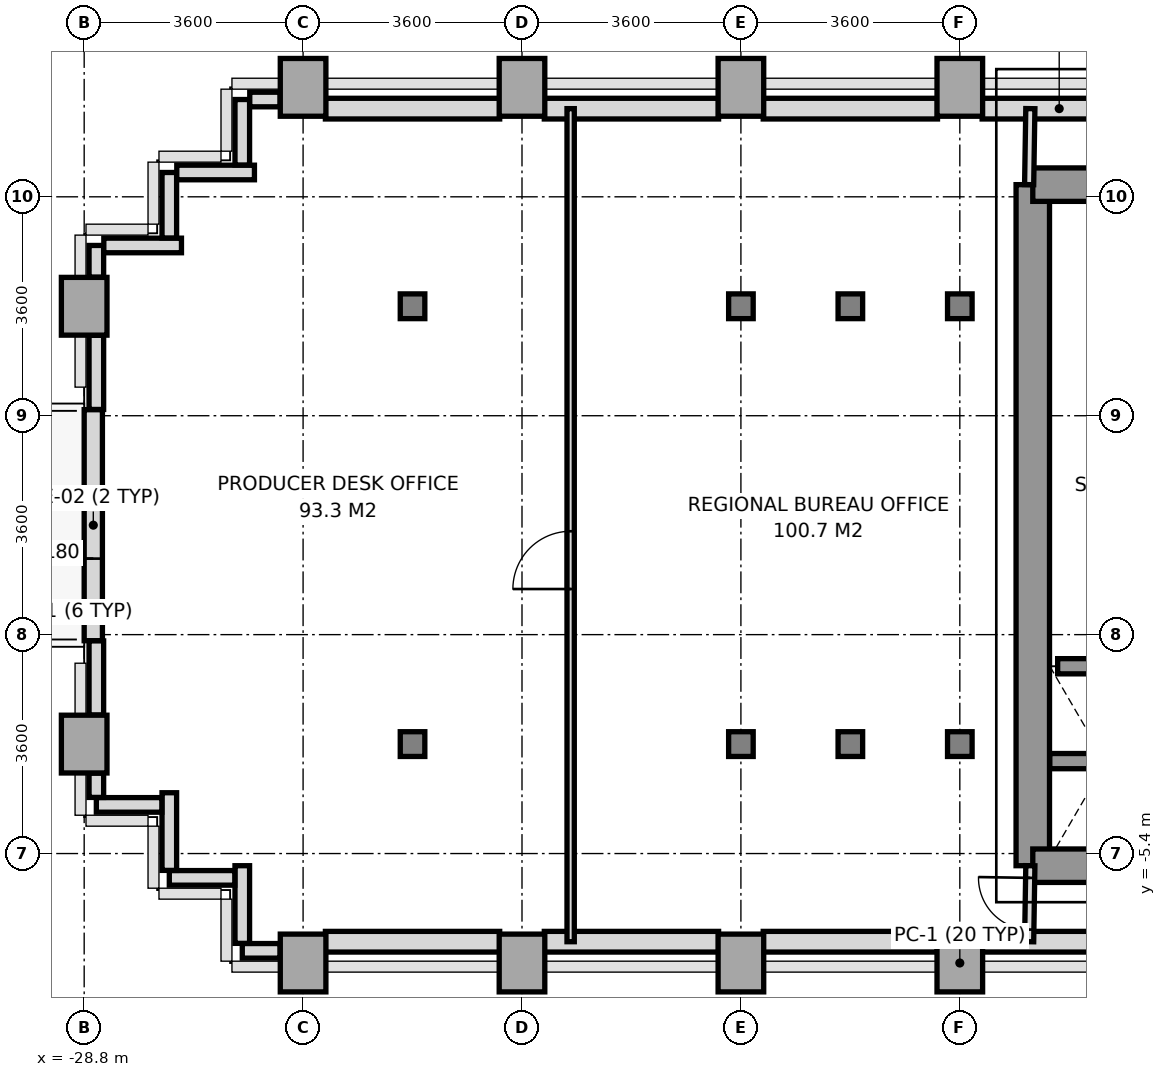
"""IFC4 building model, lengths in metres.
Left out: names, types, materials, properties, quantities, classifications, styles, units other than length and angle.
Written with IfcOpenShell. Run it as: python <this file> out.ifc"""

import sys

from ifc_helpers import new_model, si_unit, direction, frame, frame_2d, origin, origin_2d, place, context, subcontext, project, spatial, rectangle, i_section, extrude, source, transform, mapped, element, fill, save


model = new_model("IFC4")
c1 = context("Model", 3, precision=1e-05, world=origin(), true_north=direction((0.0, 1.0)))
c2 = subcontext(c1, "Body", "Model", "MODEL_VIEW")
j1 = project(units=[si_unit("LENGTHUNIT", "METRE"), si_unit("PLANEANGLEUNIT", "RADIAN")], contexts=[c1])
p1 = place(None, origin())
s1 = spatial("IfcSite", under=j1, at=p1, CompositionType="ELEMENT")
p2 = place(p1, origin())
s2 = spatial("IfcBuilding", under=s1, at=p2, CompositionType="ELEMENT")
p3 = place(p2, frame((0.0, 0.0, 44.2)))
s3 = spatial("IfcBuildingStorey", under=s2, at=p3, CompositionType="ELEMENT", Elevation=44.2)
m1 = source(origin(), c2, "Body", "SweptSolid", [
    extrude(rectangle(XDim=0.75, YDim=0.95, at=origin_2d()), origin(), (0.0, 0.0, 1.0), 3.2),
])
for number, where, z_axis, x_axis in (
    (1, (-28.8, -3.6, 0.0), (0.0, 0.0, 1.0), (1.0, 0.0, 0.0)),
    (2, (-28.8, 3.6, 0.0), (0.0, 0.0, 1.0), (1.0, 0.0, 0.0)),
    (3, (-25.2, -7.2, 0.0), (0.0, 0.0, 1.0), (1.0, 0.0, 0.0)),
    (4, (-25.2, 7.2, 0.0), (0.0, 0.0, 1.0), (1.0, 0.0, 0.0)),
):
    element("IfcColumn", number, at=place(p3, frame(where, z_axis=z_axis, x_axis=x_axis)), inside=s3, PredefinedType="COLUMN", context=c2, shape_type="MappedRepresentation", body=[
        mapped(m1, transform((0.0, 0.0, 0.0), x_axis=(1.0, 0.0, 0.0), y_axis=(0.0, 1.0, 0.0), z_axis=(0.0, 0.0, 1.0), scale=1.0)),
    ])
m2 = source(origin(), c2, "Body", "SweptSolid", [
    extrude(i_section(OverallWidth=0.404, OverallDepth=0.407, WebThickness=0.022, FlangeThickness=0.035, at=origin_2d()), origin(), (0.0, 0.0, 1.0), 3.2),
])
for number, where, z_axis, x_axis in (
    (5, (-23.4, -3.6, 0.0), (0.0, 0.0, 1.0), (1.0, 0.0, 0.0)),
    (6, (-23.4, 3.6, 0.0), (0.0, 0.0, 1.0), (1.0, 0.0, 0.0)),
):
    element("IfcColumn", number, at=place(p3, frame(where, z_axis=z_axis, x_axis=x_axis)), inside=s3, PredefinedType="COLUMN", context=c2, shape_type="MappedRepresentation", body=[
        mapped(m2, transform((0.0, 0.0, 0.0), x_axis=(1.0, 0.0, 0.0), y_axis=(0.0, 1.0, 0.0), z_axis=(0.0, 0.0, 1.0), scale=1.0)),
    ])
for number, where, z_axis, x_axis in (
    (7, (-21.6, -7.2, 0.0), (0.0, 0.0, 1.0), (1.0, 0.0, 0.0)),
    (8, (-21.6, 7.2, 0.0), (0.0, 0.0, 1.0), (1.0, 0.0, 0.0)),
    (9, (-18.0, -7.2, 0.0), (0.0, 0.0, 1.0), (1.0, 0.0, 0.0)),
):
    element("IfcColumn", number, at=place(p3, frame(where, z_axis=z_axis, x_axis=x_axis)), inside=s3, PredefinedType="COLUMN", context=c2, shape_type="MappedRepresentation", body=[
        mapped(m1, transform((0.0, 0.0, 0.0), x_axis=(1.0, 0.0, 0.0), y_axis=(0.0, 1.0, 0.0), z_axis=(0.0, 0.0, 1.0), scale=1.0)),
    ])
for number, where, z_axis, x_axis in (
    (10, (-18.0, -3.6, 0.0), (0.0, 0.0, 1.0), (1.0, 0.0, 0.0)),
    (11, (-18.0, 3.6, 0.0), (0.0, 0.0, 1.0), (1.0, 0.0, 0.0)),
):
    element("IfcColumn", number, at=place(p3, frame(where, z_axis=z_axis, x_axis=x_axis)), inside=s3, PredefinedType="COLUMN", context=c2, shape_type="MappedRepresentation", body=[
        mapped(m2, transform((0.0, 0.0, 0.0), x_axis=(1.0, 0.0, 0.0), y_axis=(0.0, 1.0, 0.0), z_axis=(0.0, 0.0, 1.0), scale=1.0)),
    ])
p4 = place(p3, frame((-18.0, 7.2, 0.0), z_axis=(0.0, 0.0, 1.0), x_axis=(1.0, 0.0, 0.0)))
e12 = element("IfcColumn", 12, at=p4, inside=s3, PredefinedType="COLUMN", context=c2, shape_type="MappedRepresentation", body=[
    mapped(m1, transform((0.0, 0.0, 0.0), x_axis=(1.0, 0.0, 0.0), y_axis=(0.0, 1.0, 0.0), z_axis=(0.0, 0.0, 1.0), scale=1.0)),
])
for number, where, z_axis, x_axis in (
    (13, (-16.2, -3.6, 0.0), (0.0, 0.0, 1.0), (1.0, 0.0, 0.0)),
    (14, (-16.2, 3.6, 0.0), (0.0, 0.0, 1.0), (1.0, 0.0, 0.0)),
):
    element("IfcColumn", number, at=place(p3, frame(where, z_axis=z_axis, x_axis=x_axis)), inside=s3, PredefinedType="COLUMN", context=c2, shape_type="MappedRepresentation", body=[
        mapped(m2, transform((0.0, 0.0, 0.0), x_axis=(1.0, 0.0, 0.0), y_axis=(0.0, 1.0, 0.0), z_axis=(0.0, 0.0, 1.0), scale=1.0)),
    ])
p5 = place(p3, frame((-14.4, -7.2, 0.0), z_axis=(0.0, 0.0, 1.0), x_axis=(1.0, 0.0, 0.0)))
e15 = element("IfcColumn", 15, at=p5, inside=s3, PredefinedType="COLUMN", context=c2, shape_type="MappedRepresentation", body=[
    mapped(m1, transform((0.0, 0.0, 0.0), x_axis=(1.0, 0.0, 0.0), y_axis=(0.0, 1.0, 0.0), z_axis=(0.0, 0.0, 1.0), scale=1.0)),
])
for number, where, z_axis, x_axis in (
    (16, (-14.4, -3.6, 0.0), (0.0, 0.0, 1.0), (1.0, 0.0, 0.0)),
    (17, (-14.4, 3.6, 0.0), (0.0, 0.0, 1.0), (1.0, 0.0, 0.0)),
):
    element("IfcColumn", number, at=place(p3, frame(where, z_axis=z_axis, x_axis=x_axis)), inside=s3, PredefinedType="COLUMN", context=c2, shape_type="MappedRepresentation", body=[
        mapped(m2, transform((0.0, 0.0, 0.0), x_axis=(1.0, 0.0, 0.0), y_axis=(0.0, 1.0, 0.0), z_axis=(0.0, 0.0, 1.0), scale=1.0)),
    ])
p6 = place(p3, frame((-14.4, 7.2, 0.0), z_axis=(0.0, 0.0, 1.0), x_axis=(1.0, 0.0, 0.0)))
e18 = element("IfcColumn", 18, at=p6, inside=s3, PredefinedType="COLUMN", context=c2, shape_type="MappedRepresentation", body=[
    mapped(m1, transform((0.0, 0.0, 0.0), x_axis=(1.0, 0.0, 0.0), y_axis=(0.0, 1.0, 0.0), z_axis=(0.0, 0.0, 1.0), scale=1.0)),
])
for number, where, z_axis, x_axis in (
    (19, (-24.833, 6.85, 0.0), (0.0, 0.0, 1.0), (1.0, 0.0, 0.0)),
    (20, (-21.233, 6.85, 0.0), (0.0, 0.0, 1.0), (1.0, 0.0, 0.0)),
    (21, (-17.633, 6.85, 0.0), (0.0, 0.0, 1.0), (1.0, 0.0, 0.0)),
):
    element("IfcWall", number, at=place(p3, frame(where, z_axis=z_axis, x_axis=x_axis)), inside=s3, PredefinedType="SOLIDWALL", context=c2, shape_type="SweptSolid", body=[
        extrude(rectangle(XDim=2.866, YDim=0.34, at=frame_2d((1.433, 0.0))), origin(), (0.0, 0.0, 1.0), 2.45),
    ])
p7 = place(p3, frame((-14.033, 6.85, 0.0), z_axis=(0.0, 0.0, 1.0), x_axis=(1.0, 0.0, 0.0)))
e22 = element("IfcWall", 22, at=p7, inside=s3, PredefinedType="SOLIDWALL", context=c2, shape_type="SweptSolid", body=[
    extrude(rectangle(XDim=2.535, YDim=0.34, at=frame_2d((1.268, 0.0))), origin(), (0.0, 0.0, 1.0), 3.2),
])
for number, where, z_axis, x_axis in (
    (23, (-24.833, -6.85, 0.0), (0.0, 0.0, 1.0), (1.0, 0.0, 0.0)),
    (24, (-21.233, -6.85, 0.0), (0.0, 0.0, 1.0), (1.0, 0.0, 0.0)),
    (25, (-17.633, -6.85, 0.0), (0.0, 0.0, 1.0), (1.0, 0.0, 0.0)),
):
    element("IfcWall", number, at=place(p3, frame(where, z_axis=z_axis, x_axis=x_axis)), inside=s3, PredefinedType="SOLIDWALL", context=c2, shape_type="SweptSolid", body=[
        extrude(rectangle(XDim=2.866, YDim=0.34, at=frame_2d((1.433, 0.0))), origin(), (0.0, 0.0, 1.0), 2.45),
    ])
p8 = place(p3, frame((-14.033, -6.85, 0.0), z_axis=(0.0, 0.0, 1.0), x_axis=(1.0, 0.0, 0.0)))
e26 = element("IfcWall", 26, at=p8, inside=s3, PredefinedType="SOLIDWALL", context=c2, shape_type="SweptSolid", body=[
    extrude(rectangle(XDim=2.283, YDim=0.34, at=frame_2d((1.142, 0.0))), origin(), (0.0, 0.0, 1.0), 3.2),
])
p9 = place(p3, frame((-28.65, -1.9, 0.0), z_axis=(0.0, 0.0, 1.0), x_axis=(0.0, 1.0, 0.0)))
e27 = element("IfcWall", 27, at=p9, inside=s3, PredefinedType="SOLIDWALL", context=c2, shape_type="SweptSolid", body=[
    extrude(rectangle(XDim=3.8, YDim=0.3, at=frame_2d((1.9, 0.0))), origin(), (0.0, 0.0, 1.0), 2.45),
])
p10 = place(p9, frame((1.35, 0.0, 0.0)))
e28 = element("IfcOpeningElement", 28, at=p10, cuts=e27, PredefinedType="OPENING", context=c2, shape_type="SweptSolid", body=[
    extrude(rectangle(XDim=1.1, YDim=2.3, at=frame_2d((0.55, 1.15))), frame((0.0, 0.16, 0.0), z_axis=(0.0, -1.0, 0.0), x_axis=(1.0, 0.0, 0.0)), (0.0, 0.0, 1.0), 0.32),
])
p11 = place(p3, frame((-25.578, -7.0, 0.0), z_axis=(0.0, 0.0, 1.0), x_axis=(-1.0, 0.0, 0.0)))
e29 = element("IfcWall", 29, at=p11, inside=s3, PredefinedType="PARAPET", context=c2, shape_type="SweptSolid", body=[
    extrude(rectangle(XDim=0.622, YDim=0.24, at=frame_2d((0.311, 0.0))), origin(), (0.0, 0.0, 1.0), 1.15),
])
p12 = place(p3, frame((-26.2, -6.877, 0.0), z_axis=(0.0, 0.0, 1.0), x_axis=(0.0, 1.0, 0.0)))
e30 = element("IfcWall", 30, at=p12, inside=s3, PredefinedType="PARAPET", context=c2, shape_type="SweptSolid", body=[
    extrude(rectangle(XDim=1.277, YDim=0.24, at=frame_2d((0.638, 0.0))), origin(), (0.0, 0.0, 1.0), 1.15),
])
p13 = place(p3, frame((-26.323, -5.8, 0.0), z_axis=(0.0, 0.0, 1.0), x_axis=(-1.0, 0.0, 0.0)))
e31 = element("IfcWall", 31, at=p13, inside=s3, PredefinedType="PARAPET", context=c2, shape_type="SweptSolid", body=[
    extrude(rectangle(XDim=1.077, YDim=0.24, at=frame_2d((0.539, 0.0))), origin(), (0.0, 0.0, 1.0), 1.15),
])
p14 = place(p3, frame((-27.4, -5.677, 0.0), z_axis=(0.0, 0.0, 1.0), x_axis=(0.0, 1.0, 0.0)))
e32 = element("IfcWall", 32, at=p14, inside=s3, PredefinedType="PARAPET", context=c2, shape_type="SweptSolid", body=[
    extrude(rectangle(XDim=1.277, YDim=0.24, at=frame_2d((0.639, 0.0))), origin(), (0.0, 0.0, 1.0), 1.15),
])
p15 = place(p3, frame((-27.523, -4.6, 0.0), z_axis=(0.0, 0.0, 1.0), x_axis=(-1.0, 0.0, 0.0)))
e33 = element("IfcWall", 33, at=p15, inside=s3, PredefinedType="PARAPET", context=c2, shape_type="SweptSolid", body=[
    extrude(rectangle(XDim=1.077, YDim=0.24, at=frame_2d((0.539, 0.0))), origin(), (0.0, 0.0, 1.0), 1.15),
])
p16 = place(p3, frame((-28.6, -4.477, 0.0), z_axis=(0.0, 0.0, 1.0), x_axis=(0.0, 1.0, 0.0)))
e34 = element("IfcWall", 34, at=p16, inside=s3, PredefinedType="PARAPET", context=c2, shape_type="SweptSolid", body=[
    extrude(rectangle(XDim=0.399, YDim=0.24, at=frame_2d((0.2, 0.0))), origin(), (0.0, 0.0, 1.0), 1.15),
])
for number, where, z_axis, x_axis in (
    (35, (-28.6, -3.122, 0.0), (0.0, 0.0, 1.0), (0.0, 1.0, 0.0)),
    (36, (-28.6, 1.903, 0.0), (0.0, 0.0, 1.0), (0.0, 1.0, 0.0)),
):
    element("IfcWall", number, at=place(p3, frame(where, z_axis=z_axis, x_axis=x_axis)), inside=s3, PredefinedType="PARAPET", context=c2, shape_type="SweptSolid", body=[
        extrude(rectangle(XDim=1.219, YDim=0.24, at=frame_2d((0.609, 0.0))), origin(), (0.0, 0.0, 1.0), 1.15),
    ])
p17 = place(p3, frame((-28.6, 4.078, 0.0), z_axis=(0.0, 0.0, 1.0), x_axis=(0.0, 1.0, 0.0)))
e37 = element("IfcWall", 37, at=p17, inside=s3, PredefinedType="PARAPET", context=c2, shape_type="SweptSolid", body=[
    extrude(rectangle(XDim=0.522, YDim=0.24, at=frame_2d((0.261, 0.0))), origin(), (0.0, 0.0, 1.0), 1.15),
])
p18 = place(p3, frame((-28.477, 4.6, 0.0), z_axis=(0.0, 0.0, 1.0), x_axis=(1.0, 0.0, 0.0)))
e38 = element("IfcWall", 38, at=p18, inside=s3, PredefinedType="PARAPET", context=c2, shape_type="SweptSolid", body=[
    extrude(rectangle(XDim=1.277, YDim=0.24, at=frame_2d((0.639, 0.0))), origin(), (0.0, 0.0, 1.0), 1.15),
])
p19 = place(p3, frame((-27.4, 4.723, 0.0), z_axis=(0.0, 0.0, 1.0), x_axis=(0.0, 1.0, 0.0)))
e39 = element("IfcWall", 39, at=p19, inside=s3, PredefinedType="PARAPET", context=c2, shape_type="SweptSolid", body=[
    extrude(rectangle(XDim=1.077, YDim=0.24, at=frame_2d((0.539, 0.0))), origin(), (0.0, 0.0, 1.0), 1.15),
])
p20 = place(p3, frame((-27.277, 5.8, 0.0), z_axis=(0.0, 0.0, 1.0), x_axis=(1.0, 0.0, 0.0)))
e40 = element("IfcWall", 40, at=p20, inside=s3, PredefinedType="PARAPET", context=c2, shape_type="SweptSolid", body=[
    extrude(rectangle(XDim=1.277, YDim=0.24, at=frame_2d((0.639, 0.0))), origin(), (0.0, 0.0, 1.0), 1.15),
])
p21 = place(p3, frame((-26.2, 5.923, 0.0), z_axis=(0.0, 0.0, 1.0), x_axis=(0.0, 1.0, 0.0)))
e41 = element("IfcWall", 41, at=p21, inside=s3, PredefinedType="PARAPET", context=c2, shape_type="SweptSolid", body=[
    extrude(rectangle(XDim=1.077, YDim=0.24, at=frame_2d((0.539, 0.0))), origin(), (0.0, 0.0, 1.0), 1.15),
])
p22 = place(p3, frame((-26.077, 7.0, 0.0), z_axis=(0.0, 0.0, 1.0), x_axis=(1.0, 0.0, 0.0)))
e42 = element("IfcWall", 42, at=p22, inside=s3, PredefinedType="PARAPET", context=c2, shape_type="SweptSolid", body=[
    extrude(rectangle(XDim=0.499, YDim=0.24, at=frame_2d((0.25, 0.0))), origin(), (0.0, 0.0, 1.0), 1.15),
])
p23 = place(p3, frame((-13.2, -5.6, 0.0), z_axis=(0.0, 0.0, 1.0), x_axis=(0.0, 1.0, 0.0)))
e43 = element("IfcWall", 43, at=p23, inside=s3, PredefinedType="SHEAR", context=c2, shape_type="SweptSolid", body=[
    extrude(rectangle(XDim=11.2, YDim=0.55, at=frame_2d((5.6, 0.0))), origin(), (0.0, 0.0, 1.0), 3.2),
])
p24 = place(p3, frame((-13.2, 5.6, 0.0), z_axis=(0.0, 0.0, 1.0), x_axis=(1.0, 0.0, 0.0)))
e44 = element("IfcWall", 44, at=p24, inside=s3, PredefinedType="SHEAR", context=c2, shape_type="SweptSolid", body=[
    extrude(rectangle(XDim=1.819, YDim=0.55, at=frame_2d((0.909, 0.0))), origin(), (0.0, 0.0, 1.0), 3.2),
])
p25 = place(p3, frame((-13.2, -5.6, 0.0), z_axis=(0.0, 0.0, 1.0), x_axis=(1.0, 0.0, 0.0)))
e45 = element("IfcWall", 45, at=p25, inside=s3, PredefinedType="SHEAR", context=c2, shape_type="SweptSolid", body=[
    extrude(rectangle(XDim=7.8, YDim=0.55, at=frame_2d((3.9, 0.0))), origin(), (0.0, 0.0, 1.0), 3.2),
])
p26 = place(p25, frame((3.6, 0.0, 0.0)))
e46 = element("IfcOpeningElement", 46, at=p26, cuts=e45, PredefinedType="OPENING", context=c2, shape_type="SweptSolid", body=[
    extrude(rectangle(XDim=1.2, YDim=2.2, at=frame_2d((0.6, 1.1))), frame((0.0, 0.285, 0.0), z_axis=(0.0, -1.0, 0.0), x_axis=(1.0, 0.0, 0.0)), (0.0, 0.0, 1.0), 0.57),
])
p27 = place(p3, frame((-12.92, -3.88, 0.0), z_axis=(0.0, 0.0, 1.0), x_axis=(1.0, 0.0, 0.0)))
e47 = element("IfcWall", 47, at=p27, inside=s3, PredefinedType="SOLIDWALL", context=c2, shape_type="SweptSolid", body=[
    extrude(rectangle(XDim=1.84, YDim=0.25, at=frame_2d((0.92, 0.0))), origin(), (0.0, 0.0, 1.0), 3.2),
])
p28 = place(p3, frame((-12.791, -2.32, 0.0), z_axis=(0.0, 0.0, 1.0), x_axis=(1.0, 0.0, 0.0)))
e48 = element("IfcWall", 48, at=p28, inside=s3, PredefinedType="SOLIDWALL", context=c2, shape_type="SweptSolid", body=[
    extrude(rectangle(XDim=1.582, YDim=0.25, at=frame_2d((0.791, 0.0))), origin(), (0.0, 0.0, 1.0), 3.2),
])
p29 = place(p3, frame((-13.26, 5.6, 0.0), z_axis=(0.0, 0.0, 1.0), x_axis=(0.016013571389, 0.999871774545, 0.0)))
e49 = element("IfcWall", 49, at=p29, inside=s3, PredefinedType="PARTITIONING", context=c2, shape_type="SweptSolid", body=[
    extrude(rectangle(XDim=1.25, YDim=0.15, at=frame_2d((0.625, 0.0))), origin(), (0.0, 0.0, 1.0), 3.2),
])
p30 = place(p3, frame((-13.26, -6.85, 0.0), z_axis=(0.0, 0.0, 1.0), x_axis=(0.016013571389, 0.999871774545, 0.0)))
e50 = element("IfcWall", 50, at=p30, inside=s3, PredefinedType="PARTITIONING", context=c2, shape_type="SweptSolid", body=[
    extrude(rectangle(XDim=1.25, YDim=0.15, at=frame_2d((0.625, 0.0))), origin(), (0.0, 0.0, 1.0), 3.2),
])
p31 = place(p30, frame((0.2, 0.0, 0.0)))
e51 = element("IfcOpeningElement", 51, at=p31, cuts=e50, PredefinedType="OPENING", context=c2, shape_type="SweptSolid", body=[
    extrude(rectangle(XDim=0.85, YDim=2.1, at=frame_2d((0.425, 1.05))), frame((0.0, 0.085, 0.0), z_axis=(0.0, -1.0, 0.0), x_axis=(1.0, 0.0, 0.0)), (0.0, 0.0, 1.0), 0.17),
])
p32 = place(p3, frame((-20.8, -6.85, 0.0), z_axis=(0.0, 0.0, 1.0), x_axis=(0.0, 1.0, 0.0)))
e52 = element("IfcWall", 52, at=p32, inside=s3, PredefinedType="PARTITIONING", context=c2, shape_type="SweptSolid", body=[
    extrude(rectangle(XDim=13.7, YDim=0.12, at=frame_2d((6.85, 0.0))), origin(), (0.0, 0.0, 1.0), 2.65),
])
p33 = place(p32, frame((5.8, 0.0, 0.0)))
e53 = element("IfcOpeningElement", 53, at=p33, cuts=e52, PredefinedType="OPENING", context=c2, shape_type="SweptSolid", body=[
    extrude(rectangle(XDim=0.95, YDim=2.15, at=frame_2d((0.475, 1.075))), frame((0.0, 0.07, 0.0), z_axis=(0.0, -1.0, 0.0), x_axis=(1.0, 0.0, 0.0)), (0.0, 0.0, 1.0), 0.14),
])
m3 = source(origin(), c2, "Body", "SweptSolid", [
    extrude(rectangle(XDim=1.1, YDim=2.3, at=frame_2d((0.55, 1.15))), frame((0.0, 0.025, 0.0), z_axis=(0.0, -1.0, 0.0), x_axis=(1.0, 0.0, 0.0)), (0.0, 0.0, 1.0), 0.05),
])
p34 = place(p10, origin())
e54 = element("IfcDoor", 54, at=p34, inside=s3, OperationType="SINGLE_SWING_LEFT", PredefinedType="DOOR", context=c2, shape_type="MappedRepresentation", body=[
    mapped(m3, transform((0.0, 0.0, 0.0), x_axis=(1.0, 0.0, 0.0), y_axis=(0.0, 1.0, 0.0), z_axis=(0.0, 0.0, 1.0), scale=1.0)),
])
fill(e28, e54)
m4 = source(origin(), c2, "Body", "SweptSolid", [
    extrude(rectangle(XDim=0.85, YDim=2.1, at=frame_2d((0.425, 1.05))), frame((0.0, 0.025, 0.0), z_axis=(0.0, -1.0, 0.0), x_axis=(1.0, 0.0, 0.0)), (0.0, 0.0, 1.0), 0.05),
])
p35 = place(p31, origin())
e55 = element("IfcDoor", 55, at=p35, inside=s3, OperationType="SINGLE_SWING_RIGHT", PredefinedType="DOOR", context=c2, shape_type="MappedRepresentation", body=[
    mapped(m4, transform((0.0, 0.0, 0.0), x_axis=(1.0, 0.0, 0.0), y_axis=(0.0, 1.0, 0.0), z_axis=(0.0, 0.0, 1.0), scale=1.0)),
])
fill(e51, e55)
m5 = source(origin(), c2, "Body", "SweptSolid", [
    extrude(rectangle(XDim=0.95, YDim=2.15, at=frame_2d((0.475, 1.075))), frame((0.0, 0.025, 0.0), z_axis=(0.0, -1.0, 0.0), x_axis=(1.0, 0.0, 0.0)), (0.0, 0.0, 1.0), 0.05),
])
p36 = place(p33, origin())
e56 = element("IfcDoor", 56, at=p36, inside=s3, OperationType="SINGLE_SWING_LEFT", PredefinedType="DOOR", context=c2, shape_type="MappedRepresentation", body=[
    mapped(m5, transform((0.0, 0.0, 0.0), x_axis=(1.0, 0.0, 0.0), y_axis=(0.0, 1.0, 0.0), z_axis=(0.0, 0.0, 1.0), scale=1.0)),
])
fill(e53, e56)
save(model, sys.argv[1])
